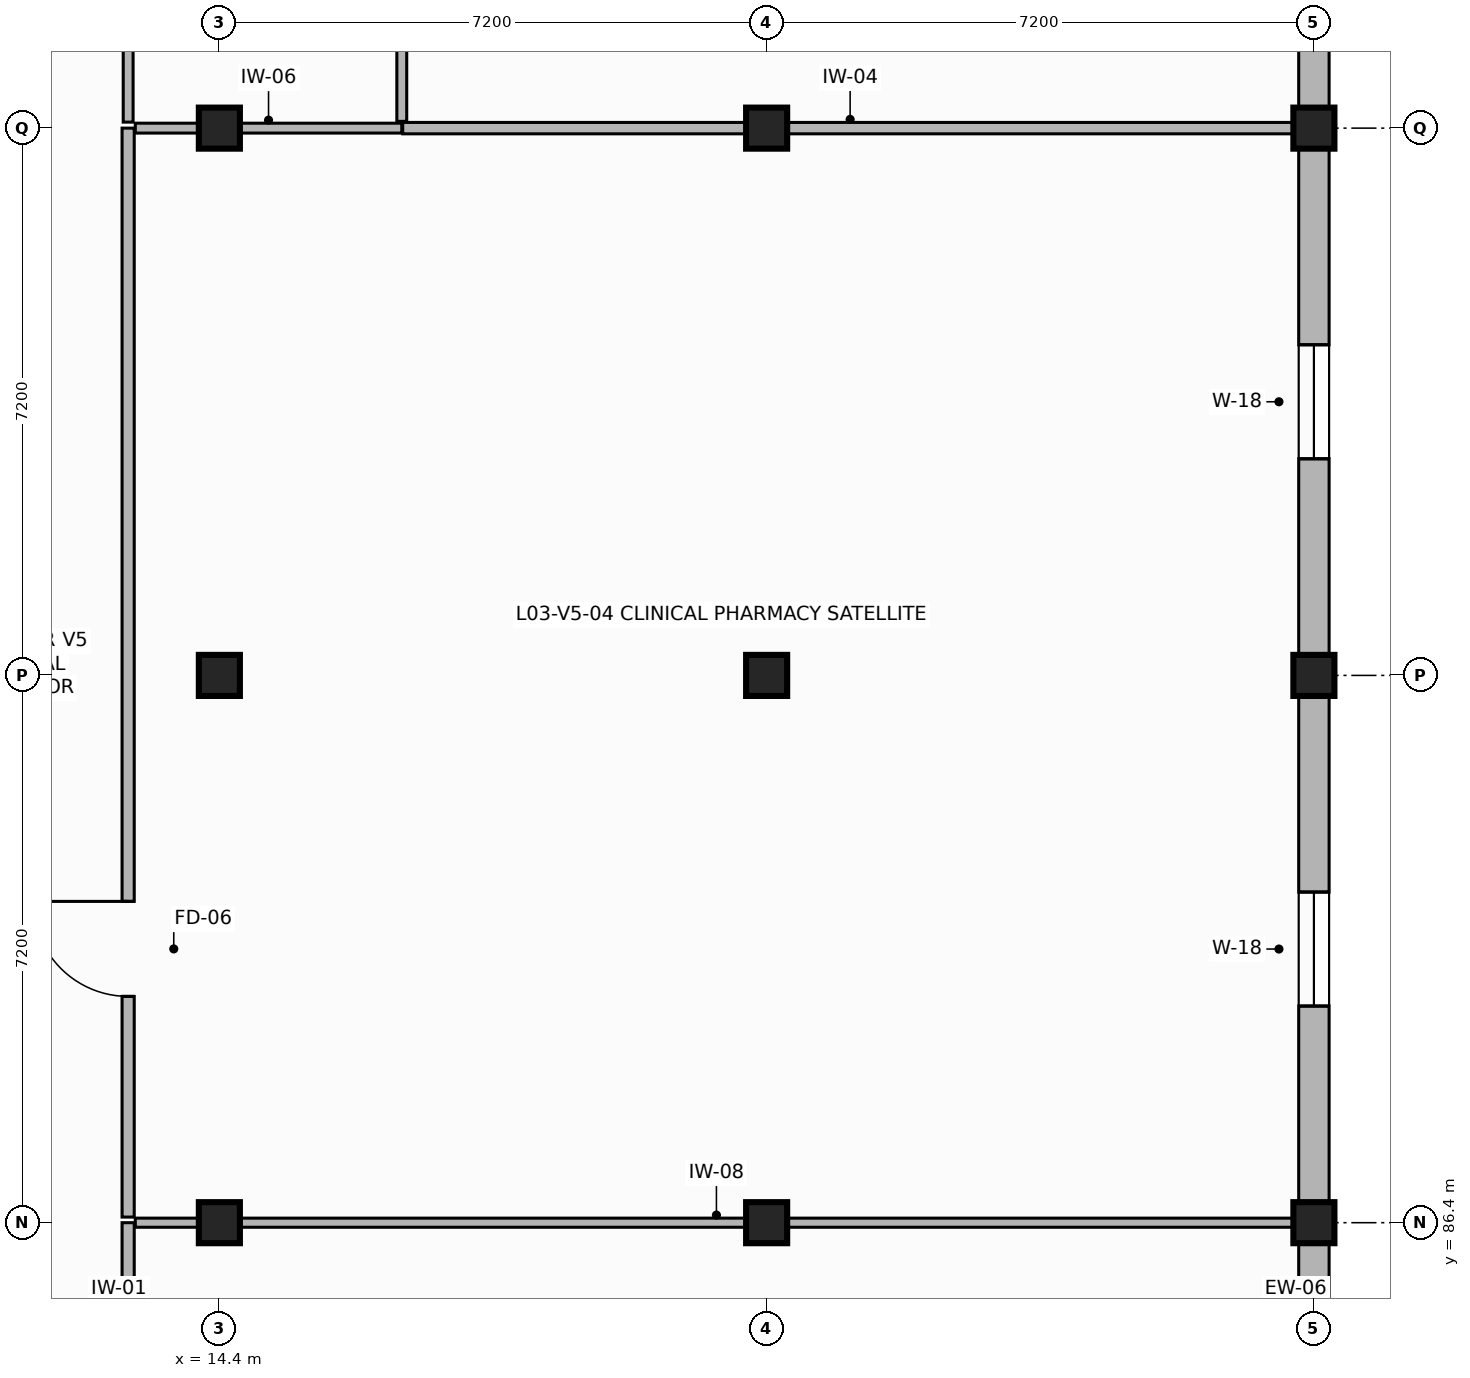
"""IFC4 building model, lengths in metres.
Left out: names, types, materials, properties, quantities, classifications, styles, units other than length and angle.
Written with IfcOpenShell. Run it as: python <this file> out.ifc"""

import sys

from ifc_helpers import new_model, si_unit, direction, frame, frame_2d, origin, origin_2d, place, context, subcontext, project, spatial, rectangle, extrude, element, fill, save


model = new_model("IFC4")
c1 = context("Model", 3, precision=1e-05, world=origin(), true_north=direction((0.0, 1.0)))
c2 = subcontext(c1, "Body", "Model", "MODEL_VIEW")
j1 = project(units=[si_unit("LENGTHUNIT", "METRE"), si_unit("PLANEANGLEUNIT", "RADIAN")], contexts=[c1])
p1 = place(None, origin())
s1 = spatial("IfcSite", under=j1, at=p1, CompositionType="ELEMENT")
p2 = place(p1, origin())
s2 = spatial("IfcBuilding", under=s1, at=p2, CompositionType="ELEMENT")
p3 = place(p2, frame((0.0, 0.0, 12.3)))
s3 = spatial("IfcBuildingStorey", under=s2, at=p3, CompositionType="ELEMENT", Elevation=12.3)
for number, where, z_axis, x_axis in (
    (1, (14.4, 86.4, 0.0), (0.0, 0.0, 1.0), (1.0, 0.0, 0.0)),
    (2, (14.4, 93.6, 0.0), (0.0, 0.0, 1.0), (1.0, 0.0, 0.0)),
    (3, (14.4, 100.8, 0.0), (0.0, 0.0, 1.0), (1.0, 0.0, 0.0)),
    (4, (21.6, 86.4, 0.0), (0.0, 0.0, 1.0), (1.0, 0.0, 0.0)),
    (5, (21.6, 93.6, 0.0), (0.0, 0.0, 1.0), (1.0, 0.0, 0.0)),
    (6, (21.6, 100.8, 0.0), (0.0, 0.0, 1.0), (1.0, 0.0, 0.0)),
    (7, (28.8, 86.4, 0.0), (0.0, 0.0, 1.0), (1.0, 0.0, 0.0)),
    (8, (28.8, 93.6, 0.0), (0.0, 0.0, 1.0), (1.0, 0.0, 0.0)),
    (9, (28.8, 100.8, 0.0), (0.0, 0.0, 1.0), (1.0, 0.0, 0.0)),
):
    element("IfcColumn", number, at=place(p3, frame(where, z_axis=z_axis, x_axis=x_axis)), inside=s3, PredefinedType="COLUMN", context=c2, shape_type="SweptSolid", body=[
        extrude(rectangle(XDim=0.54, YDim=0.54, at=origin_2d()), origin(), (0.0, 0.0, 1.0), 3.39),
    ])
p4 = place(p3, frame((28.8, 79.2, 0.0), z_axis=(0.0, 0.0, 1.0), x_axis=(0.0, 1.0, 0.0)))
e10 = element("IfcWall", 10, at=p4, inside=s3, PredefinedType="SOLIDWALL", context=c2, shape_type="SweptSolid", body=[
    extrude(rectangle(XDim=7.2, YDim=0.4, at=frame_2d((3.6, 0.0))), origin(), (0.0, 0.0, 1.0), 2.72),
])
p5 = place(p4, frame((2.85, 0.0, 0.9)))
e11 = element("IfcOpeningElement", 11, at=p5, cuts=e10, PredefinedType="OPENING", context=c2, shape_type="SweptSolid", body=[
    extrude(rectangle(XDim=1.5, YDim=1.6, at=frame_2d((0.75, 0.8))), frame((0.0, 0.21, 0.0), z_axis=(0.0, -1.0, 0.0), x_axis=(1.0, 0.0, 0.0)), (0.0, 0.0, 1.0), 0.42),
])
p6 = place(p3, frame((28.8, 86.4, 0.0), z_axis=(0.0, 0.0, 1.0), x_axis=(0.0, 1.0, 0.0)))
e12 = element("IfcWall", 12, at=p6, inside=s3, PredefinedType="SOLIDWALL", context=c2, shape_type="SweptSolid", body=[
    extrude(rectangle(XDim=7.2, YDim=0.4, at=frame_2d((3.6, 0.0))), origin(), (0.0, 0.0, 1.0), 2.72),
])
p7 = place(p6, frame((2.85, 0.0, 0.9)))
e13 = element("IfcOpeningElement", 13, at=p7, cuts=e12, PredefinedType="OPENING", context=c2, shape_type="SweptSolid", body=[
    extrude(rectangle(XDim=1.5, YDim=1.6, at=frame_2d((0.75, 0.8))), frame((0.0, 0.21, 0.0), z_axis=(0.0, -1.0, 0.0), x_axis=(1.0, 0.0, 0.0)), (0.0, 0.0, 1.0), 0.42),
])
p8 = place(p3, frame((28.8, 93.6, 0.0), z_axis=(0.0, 0.0, 1.0), x_axis=(0.0, 1.0, 0.0)))
e14 = element("IfcWall", 14, at=p8, inside=s3, PredefinedType="SOLIDWALL", context=c2, shape_type="SweptSolid", body=[
    extrude(rectangle(XDim=7.2, YDim=0.4, at=frame_2d((3.6, 0.0))), origin(), (0.0, 0.0, 1.0), 2.72),
])
p9 = place(p8, frame((2.85, 0.0, 0.9)))
e15 = element("IfcOpeningElement", 15, at=p9, cuts=e14, PredefinedType="OPENING", context=c2, shape_type="SweptSolid", body=[
    extrude(rectangle(XDim=1.5, YDim=1.6, at=frame_2d((0.75, 0.8))), frame((0.0, 0.21, 0.0), z_axis=(0.0, -1.0, 0.0), x_axis=(1.0, 0.0, 0.0)), (0.0, 0.0, 1.0), 0.42),
])
p10 = place(p3, frame((28.8, 100.8, 0.0), z_axis=(0.0, 0.0, 1.0), x_axis=(0.0, 1.0, 0.0)))
e16 = element("IfcWall", 16, at=p10, inside=s3, PredefinedType="SOLIDWALL", context=c2, shape_type="SweptSolid", body=[
    extrude(rectangle(XDim=7.2, YDim=0.4, at=frame_2d((3.6, 0.0))), origin(), (0.0, 0.0, 1.0), 2.72),
])
p11 = place(p10, frame((2.85, 0.0, 0.9)))
e17 = element("IfcOpeningElement", 17, at=p11, cuts=e16, PredefinedType="OPENING", context=c2, shape_type="SweptSolid", body=[
    extrude(rectangle(XDim=1.5, YDim=1.6, at=frame_2d((0.75, 0.8))), frame((0.0, 0.21, 0.0), z_axis=(0.0, -1.0, 0.0), x_axis=(1.0, 0.0, 0.0)), (0.0, 0.0, 1.0), 0.42),
])
p12 = place(p3, frame((13.2, 79.415, 0.0), z_axis=(0.0, 0.0, 1.0), x_axis=(0.0, 1.0, 0.0)))
e18 = element("IfcWall", 18, at=p12, inside=s3, PredefinedType="PARTITIONING", context=c2, shape_type="SweptSolid", body=[
    extrude(rectangle(XDim=6.985, YDim=0.16, at=frame_2d((3.492, 0.0))), origin(), (0.0, 0.0, 1.0), 2.7),
])
p13 = place(p12, frame((2.842, 0.0, 0.0)))
e19 = element("IfcOpeningElement", 19, at=p13, cuts=e18, PredefinedType="OPENING", context=c2, shape_type="SweptSolid", body=[
    extrude(rectangle(XDim=1.3, YDim=2.25, at=frame_2d((0.65, 1.125))), frame((0.0, 0.09, 0.0), z_axis=(0.0, -1.0, 0.0), x_axis=(1.0, 0.0, 0.0)), (0.0, 0.0, 1.0), 0.18),
])
p14 = place(p3, frame((13.294, 86.4, 0.0), z_axis=(0.0, 0.0, 1.0), x_axis=(1.0, 0.0, 0.0)))
e20 = element("IfcWall", 20, at=p14, inside=s3, PredefinedType="PARTITIONING", context=c2, shape_type="SweptSolid", body=[
    extrude(rectangle(XDim=15.291, YDim=0.12, at=frame_2d((7.646, 0.0))), origin(), (0.0, 0.0, 1.0), 2.7),
])
p15 = place(p3, frame((13.2, 86.474, 0.0), z_axis=(0.0, 0.0, 1.0), x_axis=(0.0, 1.0, 0.0)))
e21 = element("IfcWall", 21, at=p15, inside=s3, PredefinedType="PARTITIONING", context=c2, shape_type="SweptSolid", body=[
    extrude(rectangle(XDim=14.326, YDim=0.16, at=frame_2d((7.163, 0.0))), origin(), (0.0, 0.0, 1.0), 2.7),
])
p16 = place(p15, frame((2.903, 0.0, 0.0)))
e22 = element("IfcOpeningElement", 22, at=p16, cuts=e21, PredefinedType="OPENING", context=c2, shape_type="SweptSolid", body=[
    extrude(rectangle(XDim=1.25, YDim=2.2, at=frame_2d((0.625, 1.1))), frame((0.0, 0.09, 0.0), z_axis=(0.0, -1.0, 0.0), x_axis=(1.0, 0.0, 0.0)), (0.0, 0.0, 1.0), 0.18),
])
p17 = place(p3, frame((13.294, 100.8, 0.0), z_axis=(0.0, 0.0, 1.0), x_axis=(1.0, 0.0, 0.0)))
e23 = element("IfcWall", 23, at=p17, inside=s3, PredefinedType="PARTITIONING", context=c2, shape_type="SweptSolid", body=[
    extrude(rectangle(XDim=3.506, YDim=0.13, at=frame_2d((1.753, 0.0))), origin(), (0.0, 0.0, 1.0), 2.7),
])
p18 = place(p3, frame((16.812, 100.8, 0.0), z_axis=(0.0, 0.0, 1.0), x_axis=(1.0, 0.0, 0.0)))
e24 = element("IfcWall", 24, at=p18, inside=s3, PredefinedType="PARTITIONING", context=c2, shape_type="SweptSolid", body=[
    extrude(rectangle(XDim=11.773, YDim=0.15, at=frame_2d((5.886, 0.0))), origin(), (0.0, 0.0, 1.0), 2.7),
])
p19 = place(p3, frame((16.8, 105.321, 0.0), z_axis=(0.0, 0.0, 1.0), x_axis=(0.0, -1.0, 0.0)))
e25 = element("IfcWall", 25, at=p19, inside=s3, PredefinedType="PARTITIONING", context=c2, shape_type="SweptSolid", body=[
    extrude(rectangle(XDim=4.432, YDim=0.13, at=frame_2d((2.216, 0.0))), origin(), (0.0, 0.0, 1.0), 2.7),
])
p20 = place(p3, frame((13.2, 100.879, 0.0), z_axis=(0.0, 0.0, 1.0), x_axis=(0.0, 1.0, 0.0)))
e26 = element("IfcWall", 26, at=p20, inside=s3, PredefinedType="PARTITIONING", context=c2, shape_type="SweptSolid", body=[
    extrude(rectangle(XDim=4.442, YDim=0.13, at=frame_2d((2.221, 0.0))), origin(), (0.0, 0.0, 1.0), 2.7),
])
p21 = place(p20, frame((3.012, 0.0, 0.0)))
e27 = element("IfcOpeningElement", 27, at=p21, cuts=e26, PredefinedType="OPENING", context=c2, shape_type="SweptSolid", body=[
    extrude(rectangle(XDim=0.95, YDim=2.1, at=frame_2d((0.475, 1.05))), frame((0.0, 0.075, 0.0), z_axis=(0.0, -1.0, 0.0), x_axis=(1.0, 0.0, 0.0)), (0.0, 0.0, 1.0), 0.15),
])
p22 = place(p7, origin())
e28 = element("IfcWindow", 28, at=p22, inside=s3, PartitioningType="SINGLE_PANEL", PredefinedType="WINDOW", context=c2, shape_type="SweptSolid", body=[
    extrude(rectangle(XDim=1.5, YDim=1.6, at=frame_2d((0.75, 0.8))), frame((0.0, 0.03, 0.0), z_axis=(0.0, -1.0, 0.0), x_axis=(1.0, 0.0, 0.0)), (0.0, 0.0, 1.0), 0.06),
])
fill(e13, e28)
p23 = place(p9, origin())
e29 = element("IfcWindow", 29, at=p23, inside=s3, PartitioningType="SINGLE_PANEL", PredefinedType="WINDOW", context=c2, shape_type="SweptSolid", body=[
    extrude(rectangle(XDim=1.5, YDim=1.6, at=frame_2d((0.75, 0.8))), frame((0.0, 0.03, 0.0), z_axis=(0.0, -1.0, 0.0), x_axis=(1.0, 0.0, 0.0)), (0.0, 0.0, 1.0), 0.06),
])
fill(e15, e29)
p24 = place(p16, origin())
e30 = element("IfcDoor", 30, at=p24, inside=s3, OperationType="SINGLE_SWING_RIGHT", PredefinedType="DOOR", context=c2, shape_type="SweptSolid", body=[
    extrude(rectangle(XDim=1.25, YDim=2.2, at=frame_2d((0.625, 1.1))), frame((0.0, 0.025, 0.0), z_axis=(0.0, -1.0, 0.0), x_axis=(1.0, 0.0, 0.0)), (0.0, 0.0, 1.0), 0.05),
])
fill(e22, e30)
save(model, sys.argv[1])
